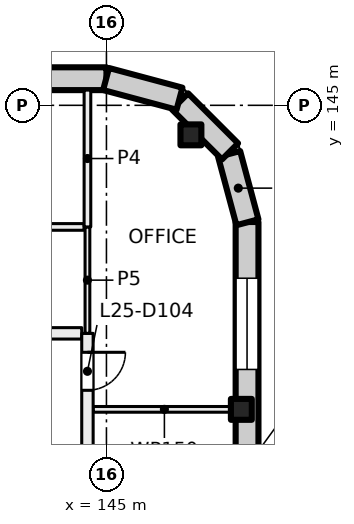
"""IFC4 building model, lengths in metres.
Left out: names, types, materials, properties, quantities, classifications, styles, units other than length and angle.
Written with IfcOpenShell. Run it as: python <this file> out.ifc"""

import sys

from ifc_helpers import new_model, si_unit, direction, frame, frame_2d, origin, origin_2d, place, context, subcontext, project, spatial, rectangle, extrude, element, fill, save


model = new_model("IFC4")
c1 = context("Model", 3, precision=1e-05, world=origin(), true_north=direction((0.0, 1.0)))
c2 = subcontext(c1, "Body", "Model", "MODEL_VIEW")
j1 = project(units=[si_unit("LENGTHUNIT", "METRE"), si_unit("PLANEANGLEUNIT", "RADIAN")], contexts=[c1])
p1 = place(None, origin())
s1 = spatial("IfcSite", under=j1, at=p1, CompositionType="ELEMENT")
p2 = place(p1, origin())
s2 = spatial("IfcBuilding", under=s1, at=p2, CompositionType="ELEMENT")
p3 = place(p2, frame((0.0, 0.0, 109.0)))
s3 = spatial("IfcBuildingStorey", under=s2, at=p3, CompositionType="ELEMENT", Elevation=109.0)
for number, where, z_axis, x_axis in (
    (1, (148.55, 137.0, 0.0), (0.0, 0.0, 1.0), (1.0, 0.0, 0.0)),
    (2, (147.223, 144.223, 0.0), (0.0, 0.0, 1.0), (1.0, 0.0, 0.0)),
):
    element("IfcColumn", number, at=place(p3, frame(where, z_axis=z_axis, x_axis=x_axis)), inside=s3, PredefinedType="COLUMN", context=c2, shape_type="SweptSolid", body=[
        extrude(rectangle(XDim=0.55, YDim=0.55, at=origin_2d()), origin(), (0.0, 0.0, 1.0), 4.0),
    ])
p4 = place(p3, frame((131.07, 145.7, 0.0), z_axis=(0.0, 0.0, 1.0), x_axis=(1.0, 0.0, 0.0)))
e3 = element("IfcWall", 3, at=p4, inside=s3, PredefinedType="SOLIDWALL", context=c2, shape_type="SweptSolid", body=[
    extrude(rectangle(XDim=13.93, YDim=0.6, at=frame_2d((6.965, 0.0))), origin(), (0.0, 0.0, 1.0), 3.625),
])
p5 = place(p4, frame((0.98, 0.0, 0.9)))
e4 = element("IfcOpeningElement", 4, at=p5, cuts=e3, PredefinedType="OPENING", context=c2, shape_type="SweptSolid", body=[
    extrude(rectangle(XDim=2.4, YDim=2.4, at=frame_2d((1.2, 1.2))), frame((0.0, 0.31, 0.0), z_axis=(0.0, -1.0, 0.0), x_axis=(1.0, 0.0, 0.0)), (0.0, 0.0, 1.0), 0.62),
])
p6 = place(p4, frame((5.48, 0.0, 0.9)))
e5 = element("IfcOpeningElement", 5, at=p6, cuts=e3, PredefinedType="OPENING", context=c2, shape_type="SweptSolid", body=[
    extrude(rectangle(XDim=2.4, YDim=2.4, at=frame_2d((1.2, 1.2))), frame((0.0, 0.31, 0.0), z_axis=(0.0, -1.0, 0.0), x_axis=(1.0, 0.0, 0.0)), (0.0, 0.0, 1.0), 0.62),
])
p7 = place(p4, frame((9.98, 0.0, 0.9)))
e6 = element("IfcOpeningElement", 6, at=p7, cuts=e3, PredefinedType="OPENING", context=c2, shape_type="SweptSolid", body=[
    extrude(rectangle(XDim=2.4, YDim=2.4, at=frame_2d((1.2, 1.2))), frame((0.0, 0.31, 0.0), z_axis=(0.0, -1.0, 0.0), x_axis=(1.0, 0.0, 0.0)), (0.0, 0.0, 1.0), 0.62),
])
p8 = place(p3, frame((148.7, 141.93, 0.0), z_axis=(0.0, 0.0, 1.0), x_axis=(0.0, -1.0, 0.0)))
e7 = element("IfcWall", 7, at=p8, inside=s3, PredefinedType="SOLIDWALL", context=c2, shape_type="SweptSolid", body=[
    extrude(rectangle(XDim=27.93, YDim=0.6, at=frame_2d((13.965, 0.0))), origin(), (0.0, 0.0, 1.0), 3.625),
])
p9 = place(p8, frame((1.48, 0.0, 0.9)))
e8 = element("IfcOpeningElement", 8, at=p9, cuts=e7, PredefinedType="OPENING", context=c2, shape_type="SweptSolid", body=[
    extrude(rectangle(XDim=2.4, YDim=2.4, at=frame_2d((1.2, 1.2))), frame((0.0, 0.31, 0.0), z_axis=(0.0, -1.0, 0.0), x_axis=(1.0, 0.0, 0.0)), (0.0, 0.0, 1.0), 0.62),
])
p10 = place(p8, frame((5.98, 0.0, 0.9)))
e9 = element("IfcOpeningElement", 9, at=p10, cuts=e7, PredefinedType="OPENING", context=c2, shape_type="SweptSolid", body=[
    extrude(rectangle(XDim=2.4, YDim=2.4, at=frame_2d((1.2, 1.2))), frame((0.0, 0.31, 0.0), z_axis=(0.0, -1.0, 0.0), x_axis=(1.0, 0.0, 0.0)), (0.0, 0.0, 1.0), 0.62),
])
p11 = place(p8, frame((10.48, 0.0, 0.9)))
e10 = element("IfcOpeningElement", 10, at=p11, cuts=e7, PredefinedType="OPENING", context=c2, shape_type="SweptSolid", body=[
    extrude(rectangle(XDim=2.4, YDim=2.4, at=frame_2d((1.2, 1.2))), frame((0.0, 0.31, 0.0), z_axis=(0.0, -1.0, 0.0), x_axis=(1.0, 0.0, 0.0)), (0.0, 0.0, 1.0), 0.62),
])
p12 = place(p8, frame((14.98, 0.0, 0.9)))
e11 = element("IfcOpeningElement", 11, at=p12, cuts=e7, PredefinedType="OPENING", context=c2, shape_type="SweptSolid", body=[
    extrude(rectangle(XDim=2.4, YDim=2.4, at=frame_2d((1.2, 1.2))), frame((0.0, 0.31, 0.0), z_axis=(0.0, -1.0, 0.0), x_axis=(1.0, 0.0, 0.0)), (0.0, 0.0, 1.0), 0.62),
])
p13 = place(p8, frame((19.48, 0.0, 0.9)))
e12 = element("IfcOpeningElement", 12, at=p13, cuts=e7, PredefinedType="OPENING", context=c2, shape_type="SweptSolid", body=[
    extrude(rectangle(XDim=2.4, YDim=2.4, at=frame_2d((1.2, 1.2))), frame((0.0, 0.31, 0.0), z_axis=(0.0, -1.0, 0.0), x_axis=(1.0, 0.0, 0.0)), (0.0, 0.0, 1.0), 0.62),
])
p14 = place(p8, frame((23.98, 0.0, 0.9)))
e13 = element("IfcOpeningElement", 13, at=p14, cuts=e7, PredefinedType="OPENING", context=c2, shape_type="SweptSolid", body=[
    extrude(rectangle(XDim=2.4, YDim=2.4, at=frame_2d((1.2, 1.2))), frame((0.0, 0.31, 0.0), z_axis=(0.0, -1.0, 0.0), x_axis=(1.0, 0.0, 0.0)), (0.0, 0.0, 1.0), 0.62),
])
for number, where, z_axis, x_axis in (
    (14, (148.229, 143.719, 0.0), (0.0, 0.0, 1.0), (0.259, -0.966, 0.0)),
    (15, (146.936, 145.104, 0.0), (0.0, 0.0, 1.0), (0.707, -0.707, 0.0)),
):
    element("IfcWall", number, at=place(p3, frame(where, z_axis=z_axis, x_axis=x_axis)), inside=s3, PredefinedType="SOLIDWALL", context=c2, shape_type="SweptSolid", body=[
        extrude(rectangle(XDim=1.861, YDim=0.6, at=frame_2d((0.93, 0.0))), origin(), (0.0, 0.0, 1.0), 3.625),
    ])
p15 = place(p3, frame((144.99, 145.692, 0.0), z_axis=(0.0, 0.0, 1.0), x_axis=(0.965920269068, -0.258839784042, 0.0)))
e16 = element("IfcWall", 16, at=p15, inside=s3, PredefinedType="SOLIDWALL", context=c2, shape_type="SweptSolid", body=[
    extrude(rectangle(XDim=2.0, YDim=0.6, at=frame_2d((1.0, 0.0))), origin(), (0.0, 0.0, 1.0), 3.625),
])
p16 = place(p3, frame((144.35, 139.0, 0.0), z_axis=(0.0, 0.0, 1.0), x_axis=(-1.0, 0.0, 0.0)))
e17 = element("IfcWall", 17, at=p16, inside=s3, PredefinedType="PARTITIONING", context=c2, shape_type="SweptSolid", body=[
    extrude(rectangle(XDim=4.35, YDim=0.3, at=frame_2d((2.175, 0.0))), origin(), (0.0, 0.0, 1.0), 3.625),
])
p17 = place(p16, frame((1.667, 0.0, 0.0)))
e18 = element("IfcOpeningElement", 18, at=p17, cuts=e17, PredefinedType="OPENING", context=c2, shape_type="SweptSolid", body=[
    extrude(rectangle(XDim=1.0, YDim=2.1, at=frame_2d((0.5, 1.05))), frame((0.0, 0.16, 0.0), z_axis=(0.0, -1.0, 0.0), x_axis=(1.0, 0.0, 0.0)), (0.0, 0.0, 1.0), 0.32),
])
p18 = place(p3, frame((139.912, 141.8, 0.0), z_axis=(0.0, 0.0, 1.0), x_axis=(1.0, 0.0, 0.0)))
e19 = element("IfcWall", 19, at=p18, inside=s3, PredefinedType="PARTITIONING", context=c2, shape_type="SweptSolid", body=[
    extrude(rectangle(XDim=4.5, YDim=0.175, at=frame_2d((2.25, 0.0))), origin(), (0.0, 0.0, 1.0), 3.625),
])
p19 = place(p18, frame((1.704, 0.0, 0.0)))
e20 = element("IfcOpeningElement", 20, at=p19, cuts=e19, PredefinedType="OPENING", context=c2, shape_type="SweptSolid", body=[
    extrude(rectangle(XDim=1.2, YDim=2.1, at=frame_2d((0.6, 1.05))), frame((0.0, 0.097, 0.0), z_axis=(0.0, -1.0, 0.0), x_axis=(1.0, 0.0, 0.0)), (0.0, 0.0, 1.0), 0.195),
])
p20 = place(p3, frame((144.65, 137.0, 0.0), z_axis=(0.0, 0.0, 1.0), x_axis=(1.0, 0.0, 0.0)))
e21 = element("IfcWall", 21, at=p20, inside=s3, PredefinedType="PARTITIONING", context=c2, shape_type="SweptSolid", body=[
    extrude(rectangle(XDim=3.75, YDim=0.15, at=frame_2d((1.875, 0.0))), origin(), (0.0, 0.0, 1.0), 3.625),
])
p21 = place(p3, frame((144.5, 139.0, 0.0), z_axis=(0.0, 0.0, 1.0), x_axis=(0.0, -1.0, 0.0)))
e22 = element("IfcWall", 22, at=p21, inside=s3, PredefinedType="PARTITIONING", context=c2, shape_type="SweptSolid", body=[
    extrude(rectangle(XDim=22.0, YDim=0.3, at=frame_2d((11.0, 0.0))), origin(), (0.0, 0.0, 1.0), 3.625),
])
p22 = place(p21, frame((20.501, 0.0, 0.0)))
e23 = element("IfcOpeningElement", 23, at=p22, cuts=e22, PredefinedType="OPENING", context=c2, shape_type="SweptSolid", body=[
    extrude(rectangle(XDim=1.0, YDim=2.1, at=frame_2d((0.5, 1.05))), frame((0.0, 0.16, 0.0), z_axis=(0.0, -1.0, 0.0), x_axis=(1.0, 0.0, 0.0)), (0.0, 0.0, 1.0), 0.32),
])
p23 = place(p21, frame((15.0, 0.0, 0.0)))
e24 = element("IfcOpeningElement", 24, at=p23, cuts=e22, PredefinedType="OPENING", context=c2, shape_type="SweptSolid", body=[
    extrude(rectangle(XDim=1.0, YDim=2.1, at=frame_2d((0.5, 1.05))), frame((0.0, 0.16, 0.0), z_axis=(0.0, -1.0, 0.0), x_axis=(1.0, 0.0, 0.0)), (0.0, 0.0, 1.0), 0.32),
])
p24 = place(p21, frame((6.0, 0.0, 0.0)))
e25 = element("IfcOpeningElement", 25, at=p24, cuts=e22, PredefinedType="OPENING", context=c2, shape_type="SweptSolid", body=[
    extrude(rectangle(XDim=1.0, YDim=2.1, at=frame_2d((0.5, 1.05))), frame((0.0, 0.16, 0.0), z_axis=(0.0, -1.0, 0.0), x_axis=(1.0, 0.0, 0.0)), (0.0, 0.0, 1.0), 0.32),
])
p25 = place(p21, frame((0.499, 0.0, 0.0)))
e26 = element("IfcOpeningElement", 26, at=p25, cuts=e22, PredefinedType="OPENING", context=c2, shape_type="SweptSolid", body=[
    extrude(rectangle(XDim=1.0, YDim=2.1, at=frame_2d((0.5, 1.05))), frame((0.0, 0.16, 0.0), z_axis=(0.0, -1.0, 0.0), x_axis=(1.0, 0.0, 0.0)), (0.0, 0.0, 1.0), 0.32),
])
p26 = place(p3, frame((144.5, 141.8, 0.0), z_axis=(0.0, 0.0, 1.0), x_axis=(0.0, -1.0, 0.0)))
e27 = element("IfcWall", 27, at=p26, inside=s3, PredefinedType="PARTITIONING", context=c2, shape_type="SweptSolid", body=[
    extrude(rectangle(XDim=2.8, YDim=0.125, at=frame_2d((1.4, 0.0))), origin(), (0.0, 0.0, 1.0), 3.625),
])
p27 = place(p3, frame((144.5, 141.8, 0.0), z_axis=(0.0, 0.0, 1.0), x_axis=(0.0, 1.0, 0.0)))
e28 = element("IfcWall", 28, at=p27, inside=s3, PredefinedType="PARTITIONING", context=c2, shape_type="SweptSolid", body=[
    extrude(rectangle(XDim=3.6, YDim=0.175, at=frame_2d((1.8, 0.0))), origin(), (0.0, 0.0, 1.0), 3.625),
])
p28 = place(p9, origin())
e29 = element("IfcWindow", 29, at=p28, inside=s3, PartitioningType="SINGLE_PANEL", PredefinedType="WINDOW", context=c2, shape_type="SweptSolid", body=[
    extrude(rectangle(XDim=2.4, YDim=2.4, at=frame_2d((1.2, 1.2))), frame((0.0, 0.03, 0.0), z_axis=(0.0, -1.0, 0.0), x_axis=(1.0, 0.0, 0.0)), (0.0, 0.0, 1.0), 0.06),
])
fill(e8, e29)
p29 = place(p25, origin())
e30 = element("IfcDoor", 30, at=p29, inside=s3, OperationType="SINGLE_SWING_LEFT", PredefinedType="DOOR", context=c2, shape_type="SweptSolid", body=[
    extrude(rectangle(XDim=1.0, YDim=2.1, at=frame_2d((0.5, 1.05))), frame((0.0, 0.025, 0.0), z_axis=(0.0, -1.0, 0.0), x_axis=(1.0, 0.0, 0.0)), (0.0, 0.0, 1.0), 0.05),
])
fill(e26, e30)
save(model, sys.argv[1])
